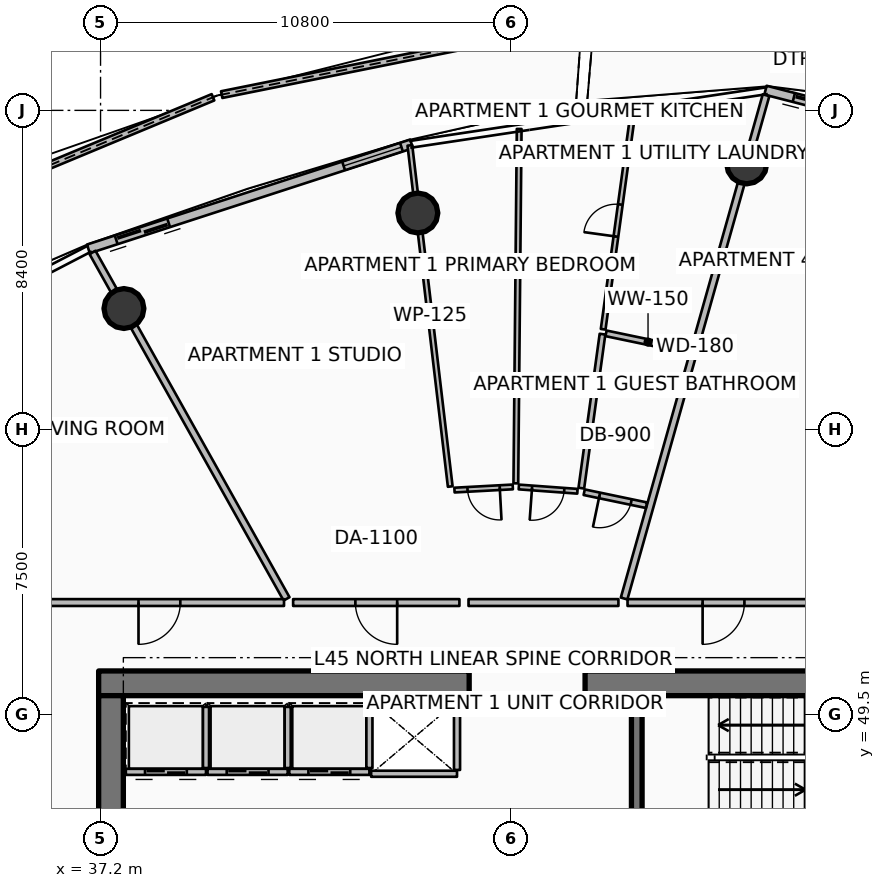
"""IFC4 building model, lengths in metres.
Left out: names, types, materials, properties, quantities, classifications, styles, units other than length and angle.
Written with IfcOpenShell. Run it as: python <this file> out.ifc"""

import sys

from ifc_helpers import new_model, si_unit, direction, frame, frame_2d, origin, origin_2d, place, context, subcontext, project, spatial, polyline, rectangle, circle, outline, extrude, element, fill, save


model = new_model("IFC4")
c1 = context("Model", 3, precision=1e-05, world=origin(), true_north=direction((0.0, 1.0)))
c2 = subcontext(c1, "Body", "Model", "MODEL_VIEW")
j1 = project(units=[si_unit("LENGTHUNIT", "METRE"), si_unit("PLANEANGLEUNIT", "RADIAN")], contexts=[c1])
p1 = place(None, origin())
s1 = spatial("IfcSite", under=j1, at=p1, CompositionType="ELEMENT")
p2 = place(p1, origin())
s2 = spatial("IfcBuilding", under=s1, at=p2, CompositionType="ELEMENT")
p3 = place(p2, frame((0.0, 0.0, 180.3)))
s3 = spatial("IfcBuildingStorey", under=s2, at=p3, CompositionType="ELEMENT", Elevation=180.3)
for number, where, z_axis, x_axis in (
    (1, (37.15, 50.325, 0.0), (0.0, 0.0, 1.0), (1.0, 0.0, 0.0)),
    (2, (49.95, 50.325, 0.0), (0.0, 0.0, 1.0), (1.0, 0.0, 0.0)),
):
    element("IfcWall", number, at=place(p3, frame(where, z_axis=z_axis, x_axis=x_axis)), inside=s3, PredefinedType="SHEAR", context=c2, shape_type="SweptSolid", body=[
        extrude(rectangle(XDim=9.75, YDim=0.65, at=frame_2d((4.875, 0.0))), origin(), (0.0, 0.0, 1.0), 3.75),
    ])
p4 = place(p3, frame((37.475, 34.0, 0.0), z_axis=(0.0, 0.0, 1.0), x_axis=(0.0, 1.0, 0.0)))
e3 = element("IfcWall", 3, at=p4, inside=s3, PredefinedType="SHEAR", context=c2, shape_type="SweptSolid", body=[
    extrude(rectangle(XDim=16.0, YDim=0.65, at=frame_2d((8.0, 0.0))), origin(), (0.0, 0.0, 1.0), 3.75),
])
p5 = place(p3, frame((51.31, 46.5, 0.0), z_axis=(0.0, 0.0, 1.0), x_axis=(0.0, 1.0, 0.0)))
e4 = element("IfcWall", 4, at=p5, inside=s3, PredefinedType="SHEAR", context=c2, shape_type="SweptSolid", body=[
    extrude(rectangle(XDim=3.5, YDim=0.28, at=frame_2d((1.75, 0.0))), origin(), (0.0, 0.0, 1.0), 3.75),
])
for number, where, z_axis, x_axis in (
    (5, (54.202, 63.992, 0.0), (0.0, 0.0, 1.0), (1.0, 0.0, 0.0)),
    (6, (45.55, 62.7, 0.0), (0.0, 0.0, 1.0), (1.0, 0.0, 0.0)),
    (7, (37.815, 60.186, 0.0), (0.0, 0.0, 1.0), (1.0, 0.0, 0.0)),
):
    element("IfcColumn", number, at=place(p3, frame(where, z_axis=z_axis, x_axis=x_axis)), inside=s3, PredefinedType="COLUMN", context=c2, shape_type="SweptSolid", body=[
        extrude(circle(Radius=0.525, at=origin_2d()), origin(), (0.0, 0.0, 1.0), 3.5),
    ])
p6 = place(p3, frame((60.529, 66.834, 0.0), z_axis=(0.0, 0.0, 1.0), x_axis=(-0.996118216942, 0.088025552404, 0.0)))
e8 = element("IfcWall", 8, at=p6, inside=s3, PredefinedType="PARAPET", context=c2, shape_type="SweptSolid", body=[
    extrude(outline(polyline([(0.0, 0.0), (10.384, 0.0), (10.384, 1.483), (5.192, 1.284), (0.0, 1.148), (0.0, 0.0)])), frame((0.0, 0.09, 0.0), z_axis=(0.0, -1.0, 0.0), x_axis=(1.0, 0.0, 0.0)), (0.0, 0.0, 1.0), 0.18),
])
p7 = place(p3, frame((49.866, 67.721, 0.0), z_axis=(0.0, 0.0, 1.0), x_axis=(-0.980371313285, -0.197160057028, 0.0)))
e9 = element("IfcWall", 9, at=p7, inside=s3, PredefinedType="PARAPET", context=c2, shape_type="SweptSolid", body=[
    extrude(outline(polyline([(0.0, 0.0), (9.668, 0.0), (9.668, 1.832), (4.834, 1.696), (0.0, 1.497), (0.0, 0.0)])), frame((0.0, 0.09, 0.0), z_axis=(0.0, -1.0, 0.0), x_axis=(1.0, 0.0, 0.0)), (0.0, 0.0, 1.0), 0.18),
])
p8 = place(p3, frame((40.159, 65.745, 0.0), z_axis=(0.0, 0.0, 1.0), x_axis=(-0.923266030552, -0.38416121203, 0.0)))
e10 = element("IfcWall", 10, at=p8, inside=s3, PredefinedType="PARAPET", context=c2, shape_type="SweptSolid", body=[
    extrude(outline(polyline([(0.0, 0.0), (9.772, 0.0), (9.772, 1.756), (4.886, 1.853), (0.0, 1.832), (0.0, 0.0)])), frame((0.0, 0.09, 0.0), z_axis=(0.0, -1.0, 0.0), x_axis=(1.0, 0.0, 0.0)), (0.0, 0.0, 1.0), 0.18),
])
p9 = place(p3, frame((64.86, 63.313, 0.0), z_axis=(0.0, 0.0, 1.0), x_axis=(-0.968374028006, 0.249502989727, 0.0)))
e11 = element("IfcWall", 11, at=p9, inside=s3, PredefinedType="SOLIDWALL", context=c2, shape_type="SweptSolid", body=[
    extrude(rectangle(XDim=10.494, YDim=0.24, at=frame_2d((5.247, 0.0))), origin(), (0.0, 0.0, 1.0), 2.45),
])
p10 = place(p9, frame((8.274, 0.0, 0.0)))
e12 = element("IfcOpeningElement", 12, at=p10, cuts=e11, PredefinedType="OPENING", context=c2, shape_type="SweptSolid", body=[
    extrude(rectangle(XDim=1.45, YDim=2.15, at=frame_2d((0.725, 1.075))), frame((0.0, 0.13, 0.0), z_axis=(0.0, -1.0, 0.0), x_axis=(1.0, 0.0, 0.0)), (0.0, 0.0, 1.0), 0.26),
])
p11 = place(p9, frame((0.28, 0.0, 0.65)))
e13 = element("IfcOpeningElement", 13, at=p11, cuts=e11, PredefinedType="OPENING", context=c2, shape_type="SweptSolid", body=[
    extrude(rectangle(XDim=1.6, YDim=1.5, at=frame_2d((0.8, 0.75))), frame((0.0, 0.13, 0.0), z_axis=(0.0, -1.0, 0.0), x_axis=(1.0, 0.0, 0.0)), (0.0, 0.0, 1.0), 0.26),
])
p12 = place(p3, frame((45.384, 64.519, 0.0), z_axis=(0.0, 0.0, 1.0), x_axis=(-0.951058543936, -0.309010753869, 0.0)))
e14 = element("IfcWall", 14, at=p12, inside=s3, PredefinedType="SOLIDWALL", context=c2, shape_type="SweptSolid", body=[
    extrude(rectangle(XDim=8.942, YDim=0.24, at=frame_2d((4.471, 0.0))), origin(), (0.0, 0.0, 1.0), 2.45),
])
p13 = place(p12, frame((6.722, 0.0, 0.0)))
e15 = element("IfcOpeningElement", 15, at=p13, cuts=e14, PredefinedType="OPENING", context=c2, shape_type="SweptSolid", body=[
    extrude(rectangle(XDim=1.45, YDim=2.15, at=frame_2d((0.725, 1.075))), frame((0.0, 0.13, 0.0), z_axis=(0.0, -1.0, 0.0), x_axis=(1.0, 0.0, 0.0)), (0.0, 0.0, 1.0), 0.26),
])
p14 = place(p12, frame((0.28, 0.0, 0.65)))
e16 = element("IfcOpeningElement", 16, at=p14, cuts=e14, PredefinedType="OPENING", context=c2, shape_type="SweptSolid", body=[
    extrude(rectangle(XDim=1.6, YDim=1.5, at=frame_2d((0.8, 0.75))), frame((0.0, 0.13, 0.0), z_axis=(0.0, -1.0, 0.0), x_axis=(1.0, 0.0, 0.0)), (0.0, 0.0, 1.0), 0.26),
])
p15 = place(p3, frame((39.975, 47.995, 0.0), z_axis=(0.0, 0.0, 1.0), x_axis=(-1.0, 0.0, 0.0)))
e17 = element("IfcWall", 17, at=p15, inside=s3, PredefinedType="PARTITIONING", context=c2, shape_type="SweptSolid", body=[
    extrude(rectangle(XDim=2.11, YDim=0.16, at=frame_2d((1.055, 0.0))), origin(), (0.0, 0.0, 1.0), 3.5),
])
p16 = place(p15, frame((0.505, 0.0, 0.0)))
e18 = element("IfcOpeningElement", 18, at=p16, cuts=e17, PredefinedType="OPENING", context=c2, shape_type="SweptSolid", body=[
    extrude(rectangle(XDim=1.1, YDim=2.1, at=frame_2d((0.55, 1.05))), frame((0.0, 0.09, 0.0), z_axis=(0.0, -1.0, 0.0), x_axis=(1.0, 0.0, 0.0)), (0.0, 0.0, 1.0), 0.18),
])
p17 = place(p3, frame((39.975, 48.095, 0.0), z_axis=(0.0, 0.0, 1.0), x_axis=(0.0, 1.0, 0.0)))
e19 = element("IfcWall", 19, at=p17, inside=s3, PredefinedType="PARTITIONING", context=c2, shape_type="SweptSolid", body=[
    extrude(rectangle(XDim=1.61, YDim=0.16, at=frame_2d((0.805, 0.0))), origin(), (0.0, 0.0, 1.0), 3.5),
])
p18 = place(p3, frame((42.125, 47.995, 0.0), z_axis=(0.0, 0.0, 1.0), x_axis=(-1.0, 0.0, 0.0)))
e20 = element("IfcWall", 20, at=p18, inside=s3, PredefinedType="PARTITIONING", context=c2, shape_type="SweptSolid", body=[
    extrude(rectangle(XDim=2.11, YDim=0.16, at=frame_2d((1.055, 0.0))), origin(), (0.0, 0.0, 1.0), 3.5),
])
p19 = place(p18, frame((0.505, 0.0, 0.0)))
e21 = element("IfcOpeningElement", 21, at=p19, cuts=e20, PredefinedType="OPENING", context=c2, shape_type="SweptSolid", body=[
    extrude(rectangle(XDim=1.1, YDim=2.1, at=frame_2d((0.55, 1.05))), frame((0.0, 0.09, 0.0), z_axis=(0.0, -1.0, 0.0), x_axis=(1.0, 0.0, 0.0)), (0.0, 0.0, 1.0), 0.18),
])
p20 = place(p3, frame((42.125, 48.095, 0.0), z_axis=(0.0, 0.0, 1.0), x_axis=(0.0, 1.0, 0.0)))
e22 = element("IfcWall", 22, at=p20, inside=s3, PredefinedType="PARTITIONING", context=c2, shape_type="SweptSolid", body=[
    extrude(rectangle(XDim=1.61, YDim=0.16, at=frame_2d((0.805, 0.0))), origin(), (0.0, 0.0, 1.0), 3.5),
])
p21 = place(p3, frame((44.275, 47.995, 0.0), z_axis=(0.0, 0.0, 1.0), x_axis=(-1.0, 0.0, 0.0)))
e23 = element("IfcWall", 23, at=p21, inside=s3, PredefinedType="PARTITIONING", context=c2, shape_type="SweptSolid", body=[
    extrude(rectangle(XDim=2.11, YDim=0.16, at=frame_2d((1.055, 0.0))), origin(), (0.0, 0.0, 1.0), 3.5),
])
p22 = place(p21, frame((0.505, 0.0, 0.0)))
e24 = element("IfcOpeningElement", 24, at=p22, cuts=e23, PredefinedType="OPENING", context=c2, shape_type="SweptSolid", body=[
    extrude(rectangle(XDim=1.1, YDim=2.1, at=frame_2d((0.55, 1.05))), frame((0.0, 0.09, 0.0), z_axis=(0.0, -1.0, 0.0), x_axis=(1.0, 0.0, 0.0)), (0.0, 0.0, 1.0), 0.18),
])
p23 = place(p3, frame((44.275, 48.095, 0.0), z_axis=(0.0, 0.0, 1.0), x_axis=(0.0, 1.0, 0.0)))
e25 = element("IfcWall", 25, at=p23, inside=s3, PredefinedType="PARTITIONING", context=c2, shape_type="SweptSolid", body=[
    extrude(rectangle(XDim=1.61, YDim=0.16, at=frame_2d((0.805, 0.0))), origin(), (0.0, 0.0, 1.0), 3.5),
])
p24 = place(p3, frame((46.58, 47.945, 0.0), z_axis=(0.0, 0.0, 1.0), x_axis=(-1.0, 0.0, 0.0)))
e26 = element("IfcWall", 26, at=p24, inside=s3, PredefinedType="PARTITIONING", context=c2, shape_type="SweptSolid", body=[
    extrude(rectangle(XDim=2.26, YDim=0.16, at=frame_2d((1.13, 0.0))), origin(), (0.0, 0.0, 1.0), 3.5),
])
p25 = place(p3, frame((46.58, 48.045, 0.0), z_axis=(0.0, 0.0, 1.0), x_axis=(0.0, 1.0, 0.0)))
e27 = element("IfcWall", 27, at=p25, inside=s3, PredefinedType="PARTITIONING", context=c2, shape_type="SweptSolid", body=[
    extrude(rectangle(XDim=1.71, YDim=0.16, at=frame_2d((0.855, 0.0))), origin(), (0.0, 0.0, 1.0), 3.5),
])
p26 = place(p3, frame((50.977, 52.556, 0.0), z_axis=(0.0, 0.0, 1.0), x_axis=(0.271443307373, 0.962454430548, 0.0)))
e28 = element("IfcWall", 28, at=p26, inside=s3, PredefinedType="PARTITIONING", context=c2, shape_type="SweptSolid", body=[
    extrude(rectangle(XDim=13.759, YDim=0.18, at=frame_2d((6.88, 0.0))), origin(), (0.0, 0.0, 1.0), 2.94),
])
p27 = place(p3, frame((42.094, 52.546, 0.0), z_axis=(0.0, 0.0, 1.0), x_axis=(-0.488614041717, 0.872500039104, 0.0)))
e29 = element("IfcWall", 29, at=p27, inside=s3, PredefinedType="PARTITIONING", context=c2, shape_type="SweptSolid", body=[
    extrude(rectangle(XDim=10.448, YDim=0.18, at=frame_2d((5.224, 0.0))), origin(), (0.0, 0.0, 1.0), 2.94),
])
p28 = place(p3, frame((46.643, 52.45, 0.0), z_axis=(0.0, 0.0, 1.0), x_axis=(-1.0, 0.0, 0.0)))
e30 = element("IfcWall", 30, at=p28, inside=s3, PredefinedType="PARTITIONING", context=c2, shape_type="SweptSolid", body=[
    extrude(rectangle(XDim=4.376, YDim=0.18, at=frame_2d((2.188, 0.0))), origin(), (0.0, 0.0, 1.0), 2.94),
])
p29 = place(p28, frame((1.638, 0.0, 0.0)))
e31 = element("IfcOpeningElement", 31, at=p29, cuts=e30, PredefinedType="OPENING", context=c2, shape_type="SweptSolid", body=[
    extrude(rectangle(XDim=1.1, YDim=2.1, at=frame_2d((0.55, 1.05))), frame((0.0, 0.1, 0.0), z_axis=(0.0, -1.0, 0.0), x_axis=(1.0, 0.0, 0.0)), (0.0, 0.0, 1.0), 0.2),
])
p30 = place(p3, frame((50.827, 52.45, 0.0), z_axis=(0.0, 0.0, 1.0), x_axis=(-1.0, 0.0, 0.0)))
e32 = element("IfcWall", 32, at=p30, inside=s3, PredefinedType="PARTITIONING", context=c2, shape_type="SweptSolid", body=[
    extrude(rectangle(XDim=3.944, YDim=0.18, at=frame_2d((1.972, 0.0))), origin(), (0.0, 0.0, 1.0), 2.94),
])
p31 = place(p3, frame((46.402, 55.503, 0.0), z_axis=(0.0, 0.0, 1.0), x_axis=(-0.117526089467, 0.993069795279, 0.0)))
e33 = element("IfcWall", 33, at=p31, inside=s3, PredefinedType="PARTITIONING", context=c2, shape_type="SweptSolid", body=[
    extrude(rectangle(XDim=9.039, YDim=0.125, at=frame_2d((4.519, 0.0))), origin(), (0.0, 0.0, 1.0), 2.94),
])
p32 = place(p3, frame((51.566, 55.011, 0.0), z_axis=(0.0, 0.0, 1.0), x_axis=(-0.978902694913, 0.204326977886, 0.0)))
e34 = element("IfcWall", 34, at=p32, inside=s3, PredefinedType="PARTITIONING", context=c2, shape_type="SweptSolid", body=[
    extrude(rectangle(XDim=1.674, YDim=0.15, at=frame_2d((0.837, 0.0))), origin(), (0.0, 0.0, 1.0), 2.94),
])
p33 = place(p32, frame((0.412, 0.0, 0.0)))
e35 = element("IfcOpeningElement", 35, at=p33, cuts=e34, PredefinedType="OPENING", context=c2, shape_type="SweptSolid", body=[
    extrude(rectangle(XDim=0.85, YDim=2.06, at=frame_2d((0.425, 1.03))), frame((0.0, 0.085, 0.0), z_axis=(0.0, -1.0, 0.0), x_axis=(1.0, 0.0, 0.0)), (0.0, 0.0, 1.0), 0.17),
])
p34 = place(p3, frame((52.711, 59.072, 0.0), z_axis=(0.0, 0.0, 1.0), x_axis=(-0.978902959225, 0.2043257116, 0.0)))
e36 = element("IfcWall", 36, at=p34, inside=s3, PredefinedType="PARTITIONING", context=c2, shape_type="SweptSolid", body=[
    extrude(rectangle(XDim=2.257, YDim=0.15, at=frame_2d((1.128, 0.0))), origin(), (0.0, 0.0, 1.0), 2.94),
])
p35 = place(p3, frame((49.851, 55.46, 0.0), z_axis=(0.0, 0.0, 1.0), x_axis=(0.136221269786, 0.990678437061, 0.0)))
e37 = element("IfcWall", 37, at=p35, inside=s3, PredefinedType="PARTITIONING", context=c2, shape_type="SweptSolid", body=[
    extrude(rectangle(XDim=4.09, YDim=0.15, at=frame_2d((2.045, 0.0))), origin(), (0.0, 0.0, 1.0), 2.94),
])
p36 = place(p3, frame((50.426, 59.641, 0.0), z_axis=(0.0, 0.0, 1.0), x_axis=(0.136229748486, 0.990677271177, 0.0)))
e38 = element("IfcWall", 38, at=p36, inside=s3, PredefinedType="PARTITIONING", context=c2, shape_type="SweptSolid", body=[
    extrude(rectangle(XDim=5.776, YDim=0.125, at=frame_2d((2.888, 0.0))), origin(), (0.0, 0.0, 1.0), 2.94),
])
p37 = place(p36, frame((2.463, 0.0, 0.0)))
e39 = element("IfcOpeningElement", 39, at=p37, cuts=e38, PredefinedType="OPENING", context=c2, shape_type="SweptSolid", body=[
    extrude(rectangle(XDim=0.85, YDim=2.06, at=frame_2d((0.425, 1.03))), frame((0.0, 0.073, 0.0), z_axis=(0.0, -1.0, 0.0), x_axis=(1.0, 0.0, 0.0)), (0.0, 0.0, 1.0), 0.145),
])
p38 = place(p3, frame((48.128, 55.586, 0.0), z_axis=(0.0, 0.0, 1.0), x_axis=(0.009424652092, 0.99995558698, 0.0)))
e40 = element("IfcWall", 40, at=p38, inside=s3, PredefinedType="PARTITIONING", context=c2, shape_type="SweptSolid", body=[
    extrude(rectangle(XDim=9.326, YDim=0.125, at=frame_2d((4.663, 0.0))), origin(), (0.0, 0.0, 1.0), 2.94),
])
p39 = place(p3, frame((49.749, 55.378, 0.0), z_axis=(0.0, 0.0, 1.0), x_axis=(-0.997335405168, 0.072952653133, 0.0)))
e41 = element("IfcWall", 41, at=p39, inside=s3, PredefinedType="PARTITIONING", context=c2, shape_type="SweptSolid", body=[
    extrude(rectangle(XDim=1.546, YDim=0.125, at=frame_2d((0.773, 0.0))), origin(), (0.0, 0.0, 1.0), 2.94),
])
p40 = place(p39, frame((0.348, 0.0, 0.0)))
e42 = element("IfcOpeningElement", 42, at=p40, cuts=e41, PredefinedType="OPENING", context=c2, shape_type="SweptSolid", body=[
    extrude(rectangle(XDim=0.85, YDim=2.06, at=frame_2d((0.425, 1.03))), frame((0.0, 0.073, 0.0), z_axis=(0.0, -1.0, 0.0), x_axis=(1.0, 0.0, 0.0)), (0.0, 0.0, 1.0), 0.145),
])
p41 = place(p3, frame((48.047, 55.492, 0.0), z_axis=(0.0, 0.0, 1.0), x_axis=(-0.998521830203, -0.054352135274, 0.0)))
e43 = element("IfcWall", 43, at=p41, inside=s3, PredefinedType="PARTITIONING", context=c2, shape_type="SweptSolid", body=[
    extrude(rectangle(XDim=1.536, YDim=0.125, at=frame_2d((0.768, 0.0))), origin(), (0.0, 0.0, 1.0), 2.94),
])
p42 = place(p41, frame((0.343, 0.0, 0.0)))
e44 = element("IfcOpeningElement", 44, at=p42, cuts=e43, PredefinedType="OPENING", context=c2, shape_type="SweptSolid", body=[
    extrude(rectangle(XDim=0.85, YDim=2.06, at=frame_2d((0.425, 1.03))), frame((0.0, 0.073, 0.0), z_axis=(0.0, -1.0, 0.0), x_axis=(1.0, 0.0, 0.0)), (0.0, 0.0, 1.0), 0.145),
])
p43 = place(p3, frame((42.028, 52.45, 0.0), z_axis=(0.0, 0.0, 1.0), x_axis=(-1.0, 0.0, 0.0)))
e45 = element("IfcWall", 45, at=p43, inside=s3, PredefinedType="PARTITIONING", context=c2, shape_type="SweptSolid", body=[
    extrude(rectangle(XDim=6.558, YDim=0.18, at=frame_2d((3.279, 0.0))), origin(), (0.0, 0.0, 1.0), 2.94),
])
p44 = place(p43, frame((2.729, 0.0, 0.0)))
e46 = element("IfcOpeningElement", 46, at=p44, cuts=e45, PredefinedType="OPENING", context=c2, shape_type="SweptSolid", body=[
    extrude(rectangle(XDim=1.1, YDim=2.1, at=frame_2d((0.55, 1.05))), frame((0.0, 0.1, 0.0), z_axis=(0.0, -1.0, 0.0), x_axis=(1.0, 0.0, 0.0)), (0.0, 0.0, 1.0), 0.2),
])
p45 = place(p3, frame((56.118, 52.45, 0.0), z_axis=(0.0, 0.0, 1.0), x_axis=(-1.0, 0.0, 0.0)))
e47 = element("IfcWall", 47, at=p45, inside=s3, PredefinedType="PARTITIONING", context=c2, shape_type="SweptSolid", body=[
    extrude(rectangle(XDim=5.051, YDim=0.18, at=frame_2d((2.525, 0.0))), origin(), (0.0, 0.0, 1.0), 2.94),
])
p46 = place(p45, frame((1.975, 0.0, 0.0)))
e48 = element("IfcOpeningElement", 48, at=p46, cuts=e47, PredefinedType="OPENING", context=c2, shape_type="SweptSolid", body=[
    extrude(rectangle(XDim=1.1, YDim=2.1, at=frame_2d((0.55, 1.05))), frame((0.0, 0.1, 0.0), z_axis=(0.0, -1.0, 0.0), x_axis=(1.0, 0.0, 0.0)), (0.0, 0.0, 1.0), 0.2),
])
p47 = place(p10, origin())
e49 = element("IfcDoor", 49, at=p47, inside=s3, OperationType="DOUBLE_DOOR_SLIDING", PredefinedType="DOOR", context=c2, shape_type="SweptSolid", body=[
    extrude(rectangle(XDim=1.45, YDim=2.15, at=frame_2d((0.725, 1.075))), frame((0.0, 0.025, 0.0), z_axis=(0.0, -1.0, 0.0), x_axis=(1.0, 0.0, 0.0)), (0.0, 0.0, 1.0), 0.05),
])
fill(e12, e49)
p48 = place(p13, origin())
e50 = element("IfcDoor", 50, at=p48, inside=s3, OperationType="DOUBLE_DOOR_SLIDING", PredefinedType="DOOR", context=c2, shape_type="SweptSolid", body=[
    extrude(rectangle(XDim=1.45, YDim=2.15, at=frame_2d((0.725, 1.075))), frame((0.0, 0.025, 0.0), z_axis=(0.0, -1.0, 0.0), x_axis=(1.0, 0.0, 0.0)), (0.0, 0.0, 1.0), 0.05),
])
fill(e15, e50)
p49 = place(p14, origin())
e51 = element("IfcWindow", 51, at=p49, inside=s3, PartitioningType="SINGLE_PANEL", PredefinedType="WINDOW", context=c2, shape_type="SweptSolid", body=[
    extrude(rectangle(XDim=1.6, YDim=1.5, at=frame_2d((0.8, 0.75))), frame((0.0, 0.03, 0.0), z_axis=(0.0, -1.0, 0.0), x_axis=(1.0, 0.0, 0.0)), (0.0, 0.0, 1.0), 0.06),
])
fill(e16, e51)
p50 = place(p16, origin())
e52 = element("IfcDoor", 52, at=p50, inside=s3, OperationType="DOUBLE_DOOR_SLIDING", PredefinedType="DOOR", context=c2, shape_type="SweptSolid", body=[
    extrude(rectangle(XDim=1.1, YDim=2.1, at=frame_2d((0.55, 1.05))), frame((0.0, 0.025, 0.0), z_axis=(0.0, -1.0, 0.0), x_axis=(1.0, 0.0, 0.0)), (0.0, 0.0, 1.0), 0.05),
])
fill(e18, e52)
p51 = place(p19, origin())
e53 = element("IfcDoor", 53, at=p51, inside=s3, OperationType="DOUBLE_DOOR_SLIDING", PredefinedType="DOOR", context=c2, shape_type="SweptSolid", body=[
    extrude(rectangle(XDim=1.1, YDim=2.1, at=frame_2d((0.55, 1.05))), frame((0.0, 0.025, 0.0), z_axis=(0.0, -1.0, 0.0), x_axis=(1.0, 0.0, 0.0)), (0.0, 0.0, 1.0), 0.05),
])
fill(e21, e53)
p52 = place(p22, origin())
e54 = element("IfcDoor", 54, at=p52, inside=s3, OperationType="DOUBLE_DOOR_SLIDING", PredefinedType="DOOR", context=c2, shape_type="SweptSolid", body=[
    extrude(rectangle(XDim=1.1, YDim=2.1, at=frame_2d((0.55, 1.05))), frame((0.0, 0.025, 0.0), z_axis=(0.0, -1.0, 0.0), x_axis=(1.0, 0.0, 0.0)), (0.0, 0.0, 1.0), 0.05),
])
fill(e24, e54)
p53 = place(p29, origin())
e55 = element("IfcDoor", 55, at=p53, inside=s3, OperationType="SINGLE_SWING_LEFT", PredefinedType="DOOR", context=c2, shape_type="SweptSolid", body=[
    extrude(rectangle(XDim=1.1, YDim=2.1, at=frame_2d((0.55, 1.05))), frame((0.0, 0.025, 0.0), z_axis=(0.0, -1.0, 0.0), x_axis=(1.0, 0.0, 0.0)), (0.0, 0.0, 1.0), 0.05),
])
fill(e31, e55)
p54 = place(p33, origin())
e56 = element("IfcDoor", 56, at=p54, inside=s3, OperationType="SINGLE_SWING_RIGHT", PredefinedType="DOOR", context=c2, shape_type="SweptSolid", body=[
    extrude(rectangle(XDim=0.85, YDim=2.06, at=frame_2d((0.425, 1.03))), frame((0.0, 0.025, 0.0), z_axis=(0.0, -1.0, 0.0), x_axis=(1.0, 0.0, 0.0)), (0.0, 0.0, 1.0), 0.05),
])
fill(e35, e56)
p55 = place(p37, origin())
e57 = element("IfcDoor", 57, at=p55, inside=s3, OperationType="SINGLE_SWING_LEFT", PredefinedType="DOOR", context=c2, shape_type="SweptSolid", body=[
    extrude(rectangle(XDim=0.85, YDim=2.06, at=frame_2d((0.425, 1.03))), frame((0.0, 0.025, 0.0), z_axis=(0.0, -1.0, 0.0), x_axis=(1.0, 0.0, 0.0)), (0.0, 0.0, 1.0), 0.05),
])
fill(e39, e57)
p56 = place(p40, origin())
e58 = element("IfcDoor", 58, at=p56, inside=s3, OperationType="SINGLE_SWING_RIGHT", PredefinedType="DOOR", context=c2, shape_type="SweptSolid", body=[
    extrude(rectangle(XDim=0.85, YDim=2.06, at=frame_2d((0.425, 1.03))), frame((0.0, 0.025, 0.0), z_axis=(0.0, -1.0, 0.0), x_axis=(1.0, 0.0, 0.0)), (0.0, 0.0, 1.0), 0.05),
])
fill(e42, e58)
p57 = place(p42, origin())
e59 = element("IfcDoor", 59, at=p57, inside=s3, OperationType="SINGLE_SWING_LEFT", PredefinedType="DOOR", context=c2, shape_type="SweptSolid", body=[
    extrude(rectangle(XDim=0.85, YDim=2.06, at=frame_2d((0.425, 1.03))), frame((0.0, 0.025, 0.0), z_axis=(0.0, -1.0, 0.0), x_axis=(1.0, 0.0, 0.0)), (0.0, 0.0, 1.0), 0.05),
])
fill(e44, e59)
p58 = place(p44, origin())
e60 = element("IfcDoor", 60, at=p58, inside=s3, OperationType="SINGLE_SWING_RIGHT", PredefinedType="DOOR", context=c2, shape_type="SweptSolid", body=[
    extrude(rectangle(XDim=1.1, YDim=2.1, at=frame_2d((0.55, 1.05))), frame((0.0, 0.025, 0.0), z_axis=(0.0, -1.0, 0.0), x_axis=(1.0, 0.0, 0.0)), (0.0, 0.0, 1.0), 0.05),
])
fill(e46, e60)
p59 = place(p46, origin())
e61 = element("IfcDoor", 61, at=p59, inside=s3, OperationType="SINGLE_SWING_RIGHT", PredefinedType="DOOR", context=c2, shape_type="SweptSolid", body=[
    extrude(rectangle(XDim=1.1, YDim=2.1, at=frame_2d((0.55, 1.05))), frame((0.0, 0.025, 0.0), z_axis=(0.0, -1.0, 0.0), x_axis=(1.0, 0.0, 0.0)), (0.0, 0.0, 1.0), 0.05),
])
fill(e48, e61)
save(model, sys.argv[1])
